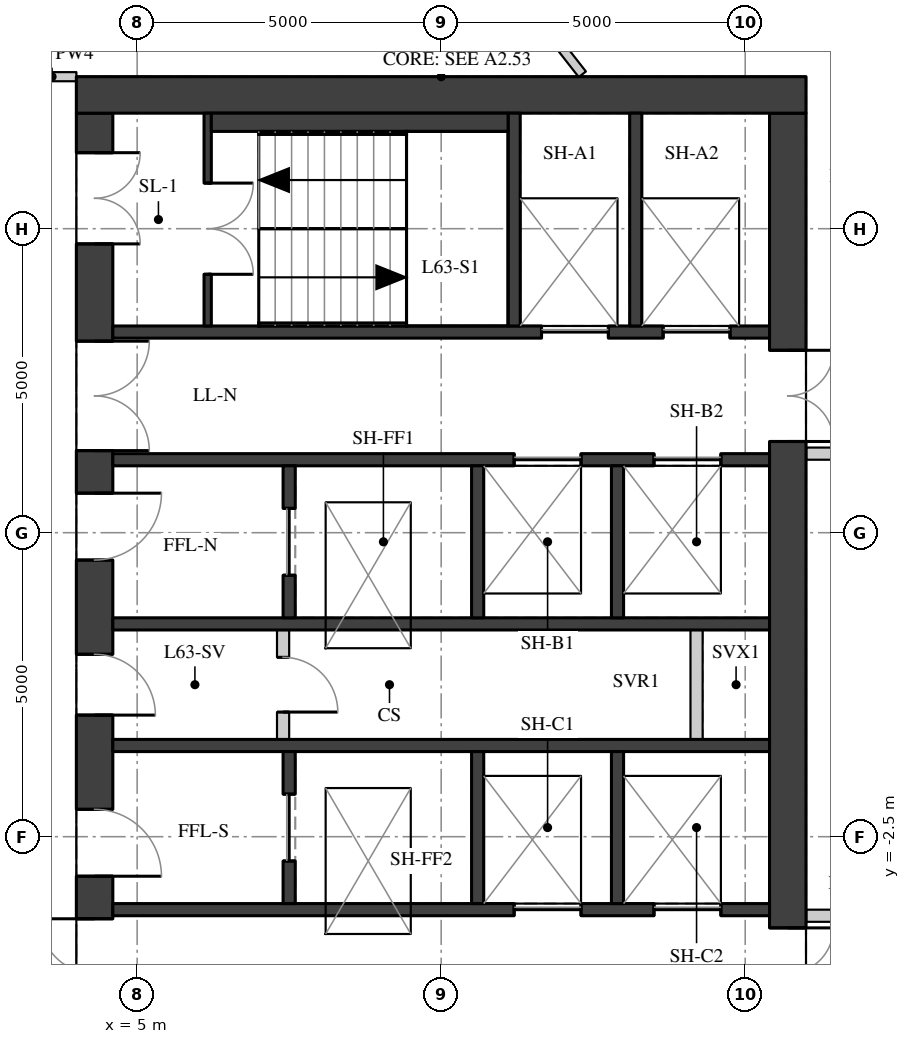
"""IFC4 building model, lengths in metres.
Left out: names, types, materials, properties, quantities, classifications, styles, units other than length and angle.
Written with IfcOpenShell. Run it as: python <this file> out.ifc"""

import sys

from ifc_helpers import new_model, si_unit, direction, frame, frame_2d, origin, place, context, subcontext, project, spatial, rectangle, extrude, element, fill, save


model = new_model("IFC4")
c1 = context("Model", 3, precision=1e-05, world=origin(), true_north=direction((0.0, 1.0)))
c2 = subcontext(c1, "Body", "Model", "MODEL_VIEW")
j1 = project(units=[si_unit("LENGTHUNIT", "METRE"), si_unit("PLANEANGLEUNIT", "RADIAN")], contexts=[c1])
p1 = place(None, origin())
s1 = spatial("IfcSite", under=j1, at=p1, CompositionType="ELEMENT")
p2 = place(p1, origin())
s2 = spatial("IfcBuilding", under=s1, at=p2, CompositionType="ELEMENT")
p3 = place(p2, frame((0.0, 0.0, 222.2)))
s3 = spatial("IfcBuildingStorey", under=s2, at=p3, CompositionType="ELEMENT", Elevation=222.2)
p4 = place(p3, frame((4.3, -9.4, 0.0), z_axis=(0.0, 0.0, 1.0), x_axis=(0.0, 1.0, 0.0)))
e1 = element("IfcWall", 1, at=p4, inside=s3, PredefinedType="SHEAR", context=c2, shape_type="SweptSolid", body=[
    extrude(rectangle(XDim=18.8, YDim=0.6, at=frame_2d((9.4, 0.0))), origin(), (0.0, 0.0, 1.0), 3.02),
])
p5 = place(p4, frame((0.65, 0.0, 0.0)))
e2 = element("IfcOpeningElement", 2, at=p5, cuts=e1, PredefinedType="OPENING", context=c2, shape_type="SweptSolid", body=[
    extrude(rectangle(XDim=1.5, YDim=2.1, at=frame_2d((0.75, 1.05))), frame((0.0, 0.31, 0.0), z_axis=(0.0, -1.0, 0.0), x_axis=(1.0, 0.0, 0.0)), (0.0, 0.0, 1.0), 0.62),
])
p6 = place(p4, frame((3.75, 0.0, 0.0)))
e3 = element("IfcOpeningElement", 3, at=p6, cuts=e1, PredefinedType="OPENING", context=c2, shape_type="SweptSolid", body=[
    extrude(rectangle(XDim=1.8, YDim=2.1, at=frame_2d((0.9, 1.05))), frame((0.0, 0.31, 0.0), z_axis=(0.0, -1.0, 0.0), x_axis=(1.0, 0.0, 0.0)), (0.0, 0.0, 1.0), 0.62),
])
p7 = place(p4, frame((6.25, 0.0, 0.0)))
e4 = element("IfcOpeningElement", 4, at=p7, cuts=e1, PredefinedType="OPENING", context=c2, shape_type="SweptSolid", body=[
    extrude(rectangle(XDim=1.1, YDim=2.1, at=frame_2d((0.55, 1.05))), frame((0.0, 0.31, 0.0), z_axis=(0.0, -1.0, 0.0), x_axis=(1.0, 0.0, 0.0)), (0.0, 0.0, 1.0), 0.62),
])
p8 = place(p4, frame((8.9, 0.0, 0.0)))
e5 = element("IfcOpeningElement", 5, at=p8, cuts=e1, PredefinedType="OPENING", context=c2, shape_type="SweptSolid", body=[
    extrude(rectangle(XDim=1.0, YDim=2.1, at=frame_2d((0.5, 1.05))), frame((0.0, 0.31, 0.0), z_axis=(0.0, -1.0, 0.0), x_axis=(1.0, 0.0, 0.0)), (0.0, 0.0, 1.0), 0.62),
])
p9 = place(p4, frame((11.45, 0.0, 0.0)))
e6 = element("IfcOpeningElement", 6, at=p9, cuts=e1, PredefinedType="OPENING", context=c2, shape_type="SweptSolid", body=[
    extrude(rectangle(XDim=1.1, YDim=2.1, at=frame_2d((0.55, 1.05))), frame((0.0, 0.31, 0.0), z_axis=(0.0, -1.0, 0.0), x_axis=(1.0, 0.0, 0.0)), (0.0, 0.0, 1.0), 0.62),
])
p10 = place(p4, frame((13.25, 0.0, 0.0)))
e7 = element("IfcOpeningElement", 7, at=p10, cuts=e1, PredefinedType="OPENING", context=c2, shape_type="SweptSolid", body=[
    extrude(rectangle(XDim=1.8, YDim=2.1, at=frame_2d((0.9, 1.05))), frame((0.0, 0.31, 0.0), z_axis=(0.0, -1.0, 0.0), x_axis=(1.0, 0.0, 0.0)), (0.0, 0.0, 1.0), 0.62),
])
p11 = place(p4, frame((16.65, 0.0, 0.0)))
e8 = element("IfcOpeningElement", 8, at=p11, cuts=e1, PredefinedType="OPENING", context=c2, shape_type="SweptSolid", body=[
    extrude(rectangle(XDim=1.5, YDim=2.1, at=frame_2d((0.75, 1.05))), frame((0.0, 0.31, 0.0), z_axis=(0.0, -1.0, 0.0), x_axis=(1.0, 0.0, 0.0)), (0.0, 0.0, 1.0), 0.62),
])
p12 = place(p3, frame((15.7, -9.4, 0.0), z_axis=(0.0, 0.0, 1.0), x_axis=(0.0, 1.0, 0.0)))
e9 = element("IfcWall", 9, at=p12, inside=s3, PredefinedType="SHEAR", context=c2, shape_type="SweptSolid", body=[
    extrude(rectangle(XDim=18.8, YDim=0.6, at=frame_2d((9.4, 0.0))), origin(), (0.0, 0.0, 1.0), 3.02),
])
p13 = place(p12, frame((13.4, 0.0, 0.0)))
e10 = element("IfcOpeningElement", 10, at=p13, cuts=e9, PredefinedType="OPENING", context=c2, shape_type="SweptSolid", body=[
    extrude(rectangle(XDim=1.5, YDim=2.1, at=frame_2d((0.75, 1.05))), frame((0.0, 0.31, 0.0), z_axis=(0.0, -1.0, 0.0), x_axis=(1.0, 0.0, 0.0)), (0.0, 0.0, 1.0), 0.62),
])
p14 = place(p12, frame((3.9, 0.0, 0.0)))
e11 = element("IfcOpeningElement", 11, at=p14, cuts=e9, PredefinedType="OPENING", context=c2, shape_type="SweptSolid", body=[
    extrude(rectangle(XDim=1.5, YDim=2.1, at=frame_2d((0.75, 1.05))), frame((0.0, 0.31, 0.0), z_axis=(0.0, -1.0, 0.0), x_axis=(1.0, 0.0, 0.0)), (0.0, 0.0, 1.0), 0.62),
])
p15 = place(p3, frame((4.0, 9.7, 0.0), z_axis=(0.0, 0.0, 1.0), x_axis=(1.0, 0.0, 0.0)))
e12 = element("IfcWall", 12, at=p15, inside=s3, PredefinedType="SHEAR", context=c2, shape_type="SweptSolid", body=[
    extrude(rectangle(XDim=12.0, YDim=0.6, at=frame_2d((6.0, 0.0))), origin(), (0.0, 0.0, 1.0), 3.02),
])
p16 = place(p3, frame((4.6, 5.8, 0.0), z_axis=(0.0, 0.0, 1.0), x_axis=(1.0, 0.0, 0.0)))
e13 = element("IfcWall", 13, at=p16, inside=s3, PredefinedType="SHEAR", context=c2, shape_type="SweptSolid", body=[
    extrude(rectangle(XDim=10.8, YDim=0.2, at=frame_2d((5.4, 0.0))), origin(), (0.0, 0.0, 1.0), 3.02),
])
p17 = place(p16, frame((7.05, 0.0, 0.0)))
e14 = element("IfcOpeningElement", 14, at=p17, cuts=e13, PredefinedType="OPENING", context=c2, shape_type="SweptSolid", body=[
    extrude(rectangle(XDim=1.1, YDim=2.1, at=frame_2d((0.55, 1.05))), frame((0.0, 0.11, 0.0), z_axis=(0.0, -1.0, 0.0), x_axis=(1.0, 0.0, 0.0)), (0.0, 0.0, 1.0), 0.22),
])
p18 = place(p16, frame((9.05, 0.0, 0.0)))
e15 = element("IfcOpeningElement", 15, at=p18, cuts=e13, PredefinedType="OPENING", context=c2, shape_type="SweptSolid", body=[
    extrude(rectangle(XDim=1.1, YDim=2.1, at=frame_2d((0.55, 1.05))), frame((0.0, 0.11, 0.0), z_axis=(0.0, -1.0, 0.0), x_axis=(1.0, 0.0, 0.0)), (0.0, 0.0, 1.0), 0.22),
])
p19 = place(p3, frame((4.6, 3.7, 0.0), z_axis=(0.0, 0.0, 1.0), x_axis=(1.0, 0.0, 0.0)))
e16 = element("IfcWall", 16, at=p19, inside=s3, PredefinedType="SHEAR", context=c2, shape_type="SweptSolid", body=[
    extrude(rectangle(XDim=10.8, YDim=0.2, at=frame_2d((5.4, 0.0))), origin(), (0.0, 0.0, 1.0), 3.02),
])
p20 = place(p19, frame((6.6, 0.0, 0.0)))
e17 = element("IfcOpeningElement", 17, at=p20, cuts=e16, PredefinedType="OPENING", context=c2, shape_type="SweptSolid", body=[
    extrude(rectangle(XDim=1.1, YDim=2.1, at=frame_2d((0.55, 1.05))), frame((0.0, 0.11, 0.0), z_axis=(0.0, -1.0, 0.0), x_axis=(1.0, 0.0, 0.0)), (0.0, 0.0, 1.0), 0.22),
])
p21 = place(p19, frame((8.9, 0.0, 0.0)))
e18 = element("IfcOpeningElement", 18, at=p21, cuts=e16, PredefinedType="OPENING", context=c2, shape_type="SweptSolid", body=[
    extrude(rectangle(XDim=1.1, YDim=2.1, at=frame_2d((0.55, 1.05))), frame((0.0, 0.11, 0.0), z_axis=(0.0, -1.0, 0.0), x_axis=(1.0, 0.0, 0.0)), (0.0, 0.0, 1.0), 0.22),
])
for number, where, z_axis, x_axis in (
    (19, (4.6, 1.0, 0.0), (0.0, 0.0, 1.0), (1.0, 0.0, 0.0)),
    (20, (4.6, -1.0, 0.0), (0.0, 0.0, 1.0), (1.0, 0.0, 0.0)),
):
    element("IfcWall", number, at=place(p3, frame(where, z_axis=z_axis, x_axis=x_axis)), inside=s3, PredefinedType="SHEAR", context=c2, shape_type="SweptSolid", body=[
        extrude(rectangle(XDim=10.8, YDim=0.2, at=frame_2d((5.4, 0.0))), origin(), (0.0, 0.0, 1.0), 3.02),
    ])
p22 = place(p3, frame((4.6, -3.7, 0.0), z_axis=(0.0, 0.0, 1.0), x_axis=(1.0, 0.0, 0.0)))
e21 = element("IfcWall", 21, at=p22, inside=s3, PredefinedType="SHEAR", context=c2, shape_type="SweptSolid", body=[
    extrude(rectangle(XDim=10.8, YDim=0.2, at=frame_2d((5.4, 0.0))), origin(), (0.0, 0.0, 1.0), 3.02),
])
p23 = place(p22, frame((6.6, 0.0, 0.0)))
e22 = element("IfcOpeningElement", 22, at=p23, cuts=e21, PredefinedType="OPENING", context=c2, shape_type="SweptSolid", body=[
    extrude(rectangle(XDim=1.1, YDim=2.1, at=frame_2d((0.55, 1.05))), frame((0.0, 0.11, 0.0), z_axis=(0.0, -1.0, 0.0), x_axis=(1.0, 0.0, 0.0)), (0.0, 0.0, 1.0), 0.22),
])
p24 = place(p22, frame((8.9, 0.0, 0.0)))
e23 = element("IfcOpeningElement", 23, at=p24, cuts=e21, PredefinedType="OPENING", context=c2, shape_type="SweptSolid", body=[
    extrude(rectangle(XDim=1.1, YDim=2.1, at=frame_2d((0.55, 1.05))), frame((0.0, 0.11, 0.0), z_axis=(0.0, -1.0, 0.0), x_axis=(1.0, 0.0, 0.0)), (0.0, 0.0, 1.0), 0.22),
])
for number, where, z_axis, x_axis in (
    (24, (11.2, 5.9, 0.0), (0.0, 0.0, 1.0), (0.0, 1.0, 0.0)),
    (25, (13.2, 5.9, 0.0), (0.0, 0.0, 1.0), (0.0, 1.0, 0.0)),
):
    element("IfcWall", number, at=place(p3, frame(where, z_axis=z_axis, x_axis=x_axis)), inside=s3, PredefinedType="SHEAR", context=c2, shape_type="SweptSolid", body=[
        extrude(rectangle(XDim=3.5, YDim=0.2, at=frame_2d((1.75, 0.0))), origin(), (0.0, 0.0, 1.0), 3.02),
    ])
p25 = place(p3, frame((7.5, 1.1, 0.0), z_axis=(0.0, 0.0, 1.0), x_axis=(0.0, 1.0, 0.0)))
e26 = element("IfcWall", 26, at=p25, inside=s3, PredefinedType="SHEAR", context=c2, shape_type="SweptSolid", body=[
    extrude(rectangle(XDim=2.5, YDim=0.2, at=frame_2d((1.25, 0.0))), origin(), (0.0, 0.0, 1.0), 3.02),
])
p26 = place(p25, frame((0.7, 0.0, 0.0)))
e27 = element("IfcOpeningElement", 27, at=p26, cuts=e26, PredefinedType="OPENING", context=c2, shape_type="SweptSolid", body=[
    extrude(rectangle(XDim=1.1, YDim=2.1, at=frame_2d((0.55, 1.05))), frame((0.0, 0.11, 0.0), z_axis=(0.0, -1.0, 0.0), x_axis=(1.0, 0.0, 0.0)), (0.0, 0.0, 1.0), 0.22),
])
p27 = place(p3, frame((7.5, -3.6, 0.0), z_axis=(0.0, 0.0, 1.0), x_axis=(0.0, 1.0, 0.0)))
e28 = element("IfcWall", 28, at=p27, inside=s3, PredefinedType="SHEAR", context=c2, shape_type="SweptSolid", body=[
    extrude(rectangle(XDim=2.5, YDim=0.2, at=frame_2d((1.25, 0.0))), origin(), (0.0, 0.0, 1.0), 3.02),
])
p28 = place(p27, frame((0.7, 0.0, 0.0)))
e29 = element("IfcOpeningElement", 29, at=p28, cuts=e28, PredefinedType="OPENING", context=c2, shape_type="SweptSolid", body=[
    extrude(rectangle(XDim=1.1, YDim=2.1, at=frame_2d((0.55, 1.05))), frame((0.0, 0.11, 0.0), z_axis=(0.0, -1.0, 0.0), x_axis=(1.0, 0.0, 0.0)), (0.0, 0.0, 1.0), 0.22),
])
for number, where, z_axis, x_axis in (
    (30, (10.6, 1.1, 0.0), (0.0, 0.0, 1.0), (0.0, 1.0, 0.0)),
    (31, (10.6, -3.6, 0.0), (0.0, 0.0, 1.0), (0.0, 1.0, 0.0)),
    (32, (12.9, 1.1, 0.0), (0.0, 0.0, 1.0), (0.0, 1.0, 0.0)),
    (33, (12.9, -3.6, 0.0), (0.0, 0.0, 1.0), (0.0, 1.0, 0.0)),
):
    element("IfcWall", number, at=place(p3, frame(where, z_axis=z_axis, x_axis=x_axis)), inside=s3, PredefinedType="SHEAR", context=c2, shape_type="SweptSolid", body=[
        extrude(rectangle(XDim=2.5, YDim=0.2, at=frame_2d((1.25, 0.0))), origin(), (0.0, 0.0, 1.0), 3.02),
    ])
p29 = place(p3, frame((6.16, 5.9, 0.0), z_axis=(0.0, 0.0, 1.0), x_axis=(0.0, 1.0, 0.0)))
e34 = element("IfcWall", 34, at=p29, inside=s3, PredefinedType="SHEAR", context=c2, shape_type="SweptSolid", body=[
    extrude(rectangle(XDim=3.5, YDim=0.12, at=frame_2d((1.75, 0.0))), origin(), (0.0, 0.0, 1.0), 3.02),
])
p30 = place(p29, frame((0.85, 0.0, 0.0)))
e35 = element("IfcOpeningElement", 35, at=p30, cuts=e34, PredefinedType="OPENING", context=c2, shape_type="SweptSolid", body=[
    extrude(rectangle(XDim=1.5, YDim=2.1, at=frame_2d((0.75, 1.05))), frame((0.0, 0.07, 0.0), z_axis=(0.0, -1.0, 0.0), x_axis=(1.0, 0.0, 0.0)), (0.0, 0.0, 1.0), 0.14),
])
p31 = place(p3, frame((7.4, -0.9, 0.0), z_axis=(0.0, 0.0, 1.0), x_axis=(0.0, 1.0, 0.0)))
e36 = element("IfcWall", 36, at=p31, inside=s3, PredefinedType="PARTITIONING", context=c2, shape_type="SweptSolid", body=[
    extrude(rectangle(XDim=1.8, YDim=0.2, at=frame_2d((0.9, 0.0))), origin(), (0.0, 0.0, 1.0), 3.02),
])
p32 = place(p31, frame((0.45, 0.0, 0.0)))
e37 = element("IfcOpeningElement", 37, at=p32, cuts=e36, PredefinedType="OPENING", context=c2, shape_type="SweptSolid", body=[
    extrude(rectangle(XDim=0.9, YDim=2.1, at=frame_2d((0.45, 1.05))), frame((0.0, 0.11, 0.0), z_axis=(0.0, -1.0, 0.0), x_axis=(1.0, 0.0, 0.0)), (0.0, 0.0, 1.0), 0.22),
])
p33 = place(p3, frame((14.2, -0.9, 0.0), z_axis=(0.0, 0.0, 1.0), x_axis=(0.0, 1.0, 0.0)))
e38 = element("IfcWall", 38, at=p33, inside=s3, PredefinedType="PARTITIONING", context=c2, shape_type="SweptSolid", body=[
    extrude(rectangle(XDim=1.8, YDim=0.2, at=frame_2d((0.9, 0.0))), origin(), (0.0, 0.0, 1.0), 3.02),
])
p34 = place(p3, frame((6.22, 9.25, 0.0), z_axis=(0.0, 0.0, 1.0), x_axis=(1.0, 0.0, 0.0)))
e39 = element("IfcWall", 39, at=p34, inside=s3, PredefinedType="PARTITIONING", context=c2, shape_type="SweptSolid", body=[
    extrude(rectangle(XDim=4.88, YDim=0.3, at=frame_2d((2.44, 0.0))), origin(), (0.0, 0.0, 1.0), 3.02),
])
p35 = place(p3, frame((17.6, 3.8, 0.0), z_axis=(0.0, 0.0, 1.0), x_axis=(-1.0, 0.0, 0.0)))
e40 = element("IfcWall", 40, at=p35, inside=s3, PredefinedType="PARTITIONING", context=c2, shape_type="SweptSolid", body=[
    extrude(rectangle(XDim=1.596, YDim=0.2, at=frame_2d((0.798, 0.0))), origin(), (0.0, 0.0, 1.0), 3.02),
])
p36 = place(p3, frame((16.004, -3.8, 0.0), z_axis=(0.0, 0.0, 1.0), x_axis=(1.0, 0.0, 0.0)))
e41 = element("IfcWall", 41, at=p36, inside=s3, PredefinedType="PARTITIONING", context=c2, shape_type="SweptSolid", body=[
    extrude(rectangle(XDim=1.596, YDim=0.2, at=frame_2d((0.798, 0.0))), origin(), (0.0, 0.0, 1.0), 2.47),
])
p37 = place(p3, frame((4.001, 10.0, 0.0), z_axis=(0.0, 0.0, 1.0), x_axis=(-1.0, 0.0, 0.0)))
e42 = element("IfcWall", 42, at=p37, inside=s3, PredefinedType="PARTITIONING", context=c2, shape_type="SweptSolid", body=[
    extrude(rectangle(XDim=0.801, YDim=0.15, at=frame_2d((0.4, 0.0))), origin(), (0.0, 0.0, 1.0), 3.02),
])
p38 = place(p3, frame((11.612, 10.946, 0.0), z_axis=(0.0, 0.0, 1.0), x_axis=(0.616228210046, -0.787567643535, 0.0)))
e43 = element("IfcWall", 43, at=p38, inside=s3, PredefinedType="PARTITIONING", context=c2, shape_type="SweptSolid", body=[
    extrude(rectangle(XDim=1.151, YDim=0.15, at=frame_2d((0.576, 0.0))), origin(), (0.0, 0.0, 1.0), 3.02),
])
p39 = place(p6, origin())
e44 = element("IfcDoor", 44, at=p39, inside=s3, OperationType="DOUBLE_DOOR_SINGLE_SWING", PredefinedType="DOOR", context=c2, shape_type="SweptSolid", body=[
    extrude(rectangle(XDim=1.8, YDim=2.1, at=frame_2d((0.9, 1.05))), frame((0.0, 0.025, 0.0), z_axis=(0.0, -1.0, 0.0), x_axis=(1.0, 0.0, 0.0)), (0.0, 0.0, 1.0), 0.05),
])
fill(e3, e44)
p40 = place(p7, origin())
e45 = element("IfcDoor", 45, at=p40, inside=s3, OperationType="SINGLE_SWING_RIGHT", PredefinedType="DOOR", context=c2, shape_type="SweptSolid", body=[
    extrude(rectangle(XDim=1.1, YDim=2.1, at=frame_2d((0.55, 1.05))), frame((0.0, 0.025, 0.0), z_axis=(0.0, -1.0, 0.0), x_axis=(1.0, 0.0, 0.0)), (0.0, 0.0, 1.0), 0.05),
])
fill(e4, e45)
p41 = place(p8, origin())
e46 = element("IfcDoor", 46, at=p41, inside=s3, OperationType="SINGLE_SWING_RIGHT", PredefinedType="DOOR", context=c2, shape_type="SweptSolid", body=[
    extrude(rectangle(XDim=1.0, YDim=2.1, at=frame_2d((0.5, 1.05))), frame((0.0, 0.025, 0.0), z_axis=(0.0, -1.0, 0.0), x_axis=(1.0, 0.0, 0.0)), (0.0, 0.0, 1.0), 0.05),
])
fill(e5, e46)
p42 = place(p9, origin())
e47 = element("IfcDoor", 47, at=p42, inside=s3, OperationType="SINGLE_SWING_LEFT", PredefinedType="DOOR", context=c2, shape_type="SweptSolid", body=[
    extrude(rectangle(XDim=1.1, YDim=2.1, at=frame_2d((0.55, 1.05))), frame((0.0, 0.025, 0.0), z_axis=(0.0, -1.0, 0.0), x_axis=(1.0, 0.0, 0.0)), (0.0, 0.0, 1.0), 0.05),
])
fill(e6, e47)
p43 = place(p10, origin())
e48 = element("IfcDoor", 48, at=p43, inside=s3, OperationType="DOUBLE_DOOR_SINGLE_SWING", PredefinedType="DOOR", context=c2, shape_type="SweptSolid", body=[
    extrude(rectangle(XDim=1.8, YDim=2.1, at=frame_2d((0.9, 1.05))), frame((0.0, 0.025, 0.0), z_axis=(0.0, -1.0, 0.0), x_axis=(1.0, 0.0, 0.0)), (0.0, 0.0, 1.0), 0.05),
])
fill(e7, e48)
p44 = place(p11, origin())
e49 = element("IfcDoor", 49, at=p44, inside=s3, OperationType="DOUBLE_DOOR_SINGLE_SWING", PredefinedType="DOOR", context=c2, shape_type="SweptSolid", body=[
    extrude(rectangle(XDim=1.5, YDim=2.1, at=frame_2d((0.75, 1.05))), frame((0.0, 0.025, 0.0), z_axis=(0.0, -1.0, 0.0), x_axis=(1.0, 0.0, 0.0)), (0.0, 0.0, 1.0), 0.05),
])
fill(e8, e49)
p45 = place(p13, origin())
e50 = element("IfcDoor", 50, at=p45, inside=s3, OperationType="DOUBLE_DOOR_SINGLE_SWING", PredefinedType="DOOR", context=c2, shape_type="SweptSolid", body=[
    extrude(rectangle(XDim=1.5, YDim=2.1, at=frame_2d((0.75, 1.05))), frame((0.0, 0.025, 0.0), z_axis=(0.0, -1.0, 0.0), x_axis=(1.0, 0.0, 0.0)), (0.0, 0.0, 1.0), 0.05),
])
fill(e10, e50)
p46 = place(p14, origin())
e51 = element("IfcDoor", 51, at=p46, inside=s3, OperationType="DOUBLE_DOOR_SINGLE_SWING", PredefinedType="DOOR", context=c2, shape_type="SweptSolid", body=[
    extrude(rectangle(XDim=1.5, YDim=2.1, at=frame_2d((0.75, 1.05))), frame((0.0, 0.025, 0.0), z_axis=(0.0, -1.0, 0.0), x_axis=(1.0, 0.0, 0.0)), (0.0, 0.0, 1.0), 0.05),
])
fill(e11, e51)
p47 = place(p30, origin())
e52 = element("IfcDoor", 52, at=p47, inside=s3, OperationType="DOUBLE_DOOR_SINGLE_SWING", PredefinedType="DOOR", context=c2, shape_type="SweptSolid", body=[
    extrude(rectangle(XDim=1.5, YDim=2.1, at=frame_2d((0.75, 1.05))), frame((0.0, 0.025, 0.0), z_axis=(0.0, -1.0, 0.0), x_axis=(1.0, 0.0, 0.0)), (0.0, 0.0, 1.0), 0.05),
])
fill(e35, e52)
p48 = place(p17, origin())
e53 = element("IfcDoor", 53, at=p48, inside=s3, OperationType="DOUBLE_DOOR_SLIDING", PredefinedType="DOOR", context=c2, shape_type="SweptSolid", body=[
    extrude(rectangle(XDim=1.1, YDim=2.1, at=frame_2d((0.55, 1.05))), frame((0.0, 0.025, 0.0), z_axis=(0.0, -1.0, 0.0), x_axis=(1.0, 0.0, 0.0)), (0.0, 0.0, 1.0), 0.05),
])
fill(e14, e53)
p49 = place(p18, origin())
e54 = element("IfcDoor", 54, at=p49, inside=s3, OperationType="DOUBLE_DOOR_SLIDING", PredefinedType="DOOR", context=c2, shape_type="SweptSolid", body=[
    extrude(rectangle(XDim=1.1, YDim=2.1, at=frame_2d((0.55, 1.05))), frame((0.0, 0.025, 0.0), z_axis=(0.0, -1.0, 0.0), x_axis=(1.0, 0.0, 0.0)), (0.0, 0.0, 1.0), 0.05),
])
fill(e15, e54)
p50 = place(p20, origin())
e55 = element("IfcDoor", 55, at=p50, inside=s3, OperationType="DOUBLE_DOOR_SLIDING", PredefinedType="DOOR", context=c2, shape_type="SweptSolid", body=[
    extrude(rectangle(XDim=1.1, YDim=2.1, at=frame_2d((0.55, 1.05))), frame((0.0, 0.025, 0.0), z_axis=(0.0, -1.0, 0.0), x_axis=(1.0, 0.0, 0.0)), (0.0, 0.0, 1.0), 0.05),
])
fill(e17, e55)
p51 = place(p21, origin())
e56 = element("IfcDoor", 56, at=p51, inside=s3, OperationType="DOUBLE_DOOR_SLIDING", PredefinedType="DOOR", context=c2, shape_type="SweptSolid", body=[
    extrude(rectangle(XDim=1.1, YDim=2.1, at=frame_2d((0.55, 1.05))), frame((0.0, 0.025, 0.0), z_axis=(0.0, -1.0, 0.0), x_axis=(1.0, 0.0, 0.0)), (0.0, 0.0, 1.0), 0.05),
])
fill(e18, e56)
p52 = place(p23, origin())
e57 = element("IfcDoor", 57, at=p52, inside=s3, OperationType="DOUBLE_DOOR_SLIDING", PredefinedType="DOOR", context=c2, shape_type="SweptSolid", body=[
    extrude(rectangle(XDim=1.1, YDim=2.1, at=frame_2d((0.55, 1.05))), frame((0.0, 0.025, 0.0), z_axis=(0.0, -1.0, 0.0), x_axis=(1.0, 0.0, 0.0)), (0.0, 0.0, 1.0), 0.05),
])
fill(e22, e57)
p53 = place(p24, origin())
e58 = element("IfcDoor", 58, at=p53, inside=s3, OperationType="DOUBLE_DOOR_SLIDING", PredefinedType="DOOR", context=c2, shape_type="SweptSolid", body=[
    extrude(rectangle(XDim=1.1, YDim=2.1, at=frame_2d((0.55, 1.05))), frame((0.0, 0.025, 0.0), z_axis=(0.0, -1.0, 0.0), x_axis=(1.0, 0.0, 0.0)), (0.0, 0.0, 1.0), 0.05),
])
fill(e23, e58)
p54 = place(p26, origin())
e59 = element("IfcDoor", 59, at=p54, inside=s3, OperationType="DOUBLE_DOOR_SLIDING", PredefinedType="DOOR", context=c2, shape_type="SweptSolid", body=[
    extrude(rectangle(XDim=1.1, YDim=2.1, at=frame_2d((0.55, 1.05))), frame((0.0, 0.025, 0.0), z_axis=(0.0, -1.0, 0.0), x_axis=(1.0, 0.0, 0.0)), (0.0, 0.0, 1.0), 0.05),
])
fill(e27, e59)
p55 = place(p28, origin())
e60 = element("IfcDoor", 60, at=p55, inside=s3, OperationType="DOUBLE_DOOR_SLIDING", PredefinedType="DOOR", context=c2, shape_type="SweptSolid", body=[
    extrude(rectangle(XDim=1.1, YDim=2.1, at=frame_2d((0.55, 1.05))), frame((0.0, 0.025, 0.0), z_axis=(0.0, -1.0, 0.0), x_axis=(1.0, 0.0, 0.0)), (0.0, 0.0, 1.0), 0.05),
])
fill(e29, e60)
p56 = place(p32, origin())
e61 = element("IfcDoor", 61, at=p56, inside=s3, OperationType="SINGLE_SWING_RIGHT", PredefinedType="DOOR", context=c2, shape_type="SweptSolid", body=[
    extrude(rectangle(XDim=0.9, YDim=2.1, at=frame_2d((0.45, 1.05))), frame((0.0, 0.025, 0.0), z_axis=(0.0, -1.0, 0.0), x_axis=(1.0, 0.0, 0.0)), (0.0, 0.0, 1.0), 0.05),
])
fill(e37, e61)
save(model, sys.argv[1])
